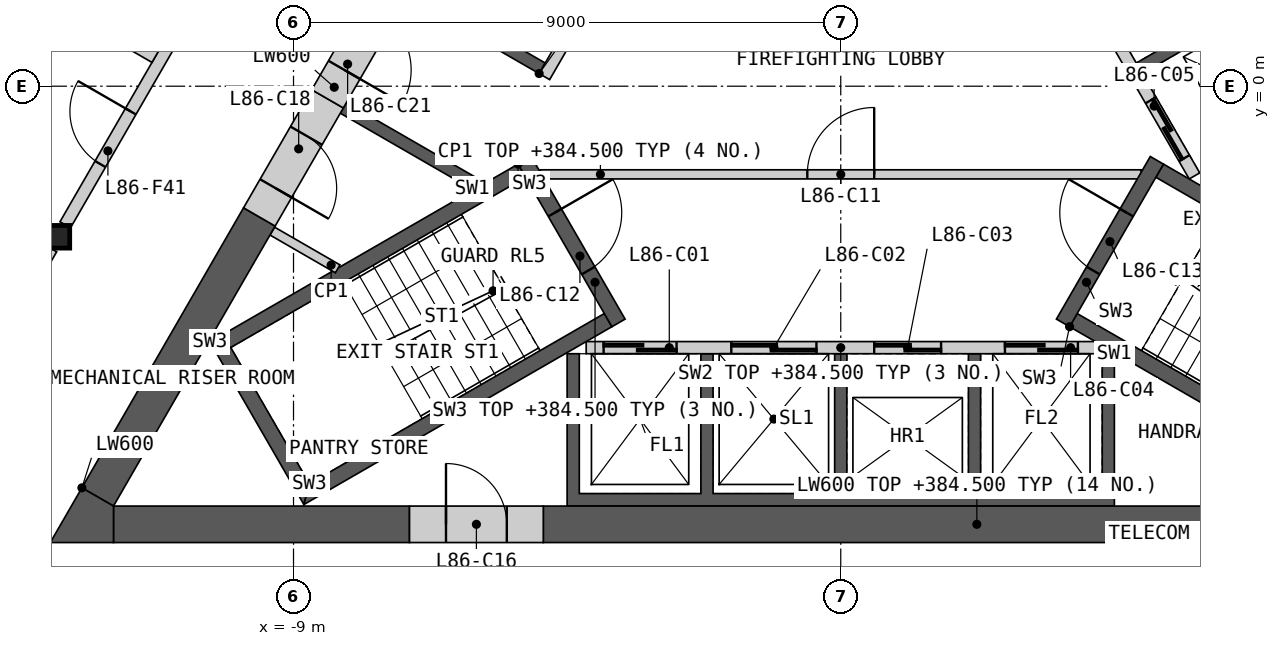
"""IFC4 building model, lengths in metres.
Left out: names, types, materials, properties, quantities, classifications, styles, units other than length and angle.
Written with IfcOpenShell. Run it as: python <this file> out.ifc"""

import sys

from ifc_helpers import new_model, si_unit, direction, frame, frame_2d, origin, origin_2d, place, context, subcontext, project, spatial, polyline, rectangle, i_section, outline, extrude, element, fill, save


model = new_model("IFC4")
c1 = context("Model", 3, precision=1e-05, world=origin(), true_north=direction((0.0, 1.0)))
c2 = subcontext(c1, "Body", "Model", "MODEL_VIEW")
j1 = project(units=[si_unit("LENGTHUNIT", "METRE"), si_unit("PLANEANGLEUNIT", "RADIAN")], contexts=[c1])
p1 = place(None, origin())
s1 = spatial("IfcSite", under=j1, at=p1, CompositionType="ELEMENT")
p2 = place(p1, origin())
s2 = spatial("IfcBuilding", under=s1, at=p2, CompositionType="ELEMENT")
p3 = place(p2, frame((0.0, 0.0, 381.4)))
s3 = spatial("IfcBuildingStorey", under=s2, at=p3, CompositionType="ELEMENT", Elevation=381.4)
p4 = place(p3, frame((-12.868, -2.476, 0.0), z_axis=(0.0, 0.0, 1.0), x_axis=(1.0, 0.0, 0.0)))
e1 = element("IfcColumn", 1, at=p4, inside=s3, PredefinedType="COLUMN", context=c2, shape_type="SweptSolid", body=[
    extrude(i_section(OverallWidth=0.374, OverallDepth=0.372, WebThickness=0.016, FlangeThickness=0.026, at=origin_2d()), origin(), (0.0, 0.0, 1.0), 3.4),
])
p5 = place(p3, origin())
e2 = element("IfcWall", 2, at=p5, inside=s3, PredefinedType="SHEAR", context=c2, shape_type="SweptSolid", body=[
    extrude(outline(polyline([(4.5, -4.4), (4.5, -6.906), (-4.5, -6.906), (-4.5, -4.4), (-4.3, -4.4), (-4.3, -6.7), (-2.3, -6.7), (-2.3, -4.4), (-2.1, -4.4), (-2.1, -6.7), (-0.1, -6.7), (-0.1, -4.4), (0.1, -4.4), (0.1, -6.7), (2.1, -6.7), (2.1, -4.4), (2.3, -4.4), (2.3, -6.7), (4.3, -6.7), (4.3, -4.4), (4.5, -4.4)])), origin(), (0.0, 0.0, 1.0), 3.1),
])
p6 = place(p3, frame((-4.187, -4.3, 0.0), z_axis=(0.0, 0.0, 1.0), x_axis=(1.0, 0.0, 0.0)))
e3 = element("IfcWall", 3, at=p6, inside=s3, PredefinedType="SOLIDWALL", context=c2, shape_type="SweptSolid", body=[
    extrude(rectangle(XDim=8.373, YDim=0.2, at=frame_2d((4.187, 0.0))), origin(), (0.0, 0.0, 1.0), 3.1),
])
p7 = place(p6, frame((0.287, 0.0, 0.0)))
e4 = element("IfcOpeningElement", 4, at=p7, cuts=e3, PredefinedType="OPENING", context=c2, shape_type="SweptSolid", body=[
    extrude(rectangle(XDim=1.2, YDim=2.1, at=frame_2d((0.6, 1.05))), frame((0.0, 0.11, 0.0), z_axis=(0.0, -1.0, 0.0), x_axis=(1.0, 0.0, 0.0)), (0.0, 0.0, 1.0), 0.22),
])
p8 = place(p6, frame((2.387, 0.0, 0.0)))
e5 = element("IfcOpeningElement", 5, at=p8, cuts=e3, PredefinedType="OPENING", context=c2, shape_type="SweptSolid", body=[
    extrude(rectangle(XDim=1.4, YDim=2.1, at=frame_2d((0.7, 1.05))), frame((0.0, 0.11, 0.0), z_axis=(0.0, -1.0, 0.0), x_axis=(1.0, 0.0, 0.0)), (0.0, 0.0, 1.0), 0.22),
])
p9 = place(p6, frame((4.737, 0.0, 0.0)))
e6 = element("IfcOpeningElement", 6, at=p9, cuts=e3, PredefinedType="OPENING", context=c2, shape_type="SweptSolid", body=[
    extrude(rectangle(XDim=1.1, YDim=2.1, at=frame_2d((0.55, 1.05))), frame((0.0, 0.11, 0.0), z_axis=(0.0, -1.0, 0.0), x_axis=(1.0, 0.0, 0.0)), (0.0, 0.0, 1.0), 0.22),
])
p10 = place(p6, frame((6.887, 0.0, 0.0)))
e7 = element("IfcOpeningElement", 7, at=p10, cuts=e3, PredefinedType="OPENING", context=c2, shape_type="SweptSolid", body=[
    extrude(rectangle(XDim=1.2, YDim=2.1, at=frame_2d((0.6, 1.05))), frame((0.0, 0.11, 0.0), z_axis=(0.0, -1.0, 0.0), x_axis=(1.0, 0.0, 0.0)), (0.0, 0.0, 1.0), 0.22),
])
p11 = place(p3, origin())
e8 = element("IfcWall", 8, at=p11, inside=s3, PredefinedType="SHEAR", context=c2, shape_type="SweptSolid", body=[
    extrude(outline(polyline([(1.561, 6.097), (3.731, 7.35), (8.231, -0.444), (6.061, -1.697), (5.96, -1.524), (7.952, -0.374), (6.952, 1.358), (4.96, 0.208), (4.861, 0.381), (6.852, 1.531), (5.852, 3.263), (3.861, 2.113), (3.76, 2.287), (5.752, 3.437), (4.752, 5.169), (2.76, 4.019), (2.66, 4.192), (4.652, 5.342), (3.652, 7.074), (1.66, 5.924), (1.561, 6.097)])), origin(), (0.0, 0.0, 1.0), 3.1),
])
p12 = place(p3, frame((5.817, -1.476, 0.0), z_axis=(0.0, 0.0, 1.0), x_axis=(-0.500002616675, 0.866023893041, 0.0)))
e9 = element("IfcWall", 9, at=p12, inside=s3, PredefinedType="SOLIDWALL", context=c2, shape_type="SweptSolid", body=[
    extrude(rectangle(XDim=8.373, YDim=0.2, at=frame_2d((4.187, 0.0))), origin(), (0.0, 0.0, 1.0), 3.1),
])
p13 = place(p12, frame((0.337, 0.0, 0.0)))
e10 = element("IfcOpeningElement", 10, at=p13, cuts=e9, PredefinedType="OPENING", context=c2, shape_type="SweptSolid", body=[
    extrude(rectangle(XDim=1.1, YDim=2.1, at=frame_2d((0.55, 1.05))), frame((0.0, 0.11, 0.0), z_axis=(0.0, -1.0, 0.0), x_axis=(1.0, 0.0, 0.0)), (0.0, 0.0, 1.0), 0.22),
])
p14 = place(p12, frame((2.537, 0.0, 0.0)))
e11 = element("IfcOpeningElement", 11, at=p14, cuts=e9, PredefinedType="OPENING", context=c2, shape_type="SweptSolid", body=[
    extrude(rectangle(XDim=1.1, YDim=2.1, at=frame_2d((0.55, 1.05))), frame((0.0, 0.11, 0.0), z_axis=(0.0, -1.0, 0.0), x_axis=(1.0, 0.0, 0.0)), (0.0, 0.0, 1.0), 0.22),
])
p15 = place(p12, frame((4.737, 0.0, 0.0)))
e12 = element("IfcOpeningElement", 12, at=p15, cuts=e9, PredefinedType="OPENING", context=c2, shape_type="SweptSolid", body=[
    extrude(rectangle(XDim=1.1, YDim=2.1, at=frame_2d((0.55, 1.05))), frame((0.0, 0.11, 0.0), z_axis=(0.0, -1.0, 0.0), x_axis=(1.0, 0.0, 0.0)), (0.0, 0.0, 1.0), 0.22),
])
p16 = place(p12, frame((7.037, 0.0, 0.0)))
e13 = element("IfcOpeningElement", 13, at=p16, cuts=e9, PredefinedType="OPENING", context=c2, shape_type="SweptSolid", body=[
    extrude(rectangle(XDim=0.9, YDim=2.1, at=frame_2d((0.45, 1.05))), frame((0.0, 0.11, 0.0), z_axis=(0.0, -1.0, 0.0), x_axis=(1.0, 0.0, 0.0)), (0.0, 0.0, 1.0), 0.22),
])
p17 = place(p3, origin())
e14 = element("IfcWall", 14, at=p17, inside=s3, PredefinedType="SHEAR", context=c2, shape_type="SweptSolid", body=[
    extrude(outline(polyline([(-6.061, -1.697), (-8.231, -0.444), (-8.131, -0.271), (-5.96, -1.524), (-6.061, -1.697)])), origin(), (0.0, 0.0, 1.0), 3.1),
])
p18 = place(p3, origin())
e15 = element("IfcWall", 15, at=p18, inside=s3, PredefinedType="SHEAR", context=c2, shape_type="SweptSolid", body=[
    extrude(outline(polyline([(-4.96, 0.208), (-7.131, 1.461), (-3.731, 7.35), (-1.561, 6.097), (-1.66, 5.924), (-3.652, 7.074), (-4.652, 5.342), (-2.66, 4.192), (-2.76, 4.019), (-4.752, 5.169), (-6.852, 1.531), (-4.861, 0.381), (-4.96, 0.208)])), origin(), (0.0, 0.0, 1.0), 3.1),
])
p19 = place(p3, frame((-1.631, 5.776, 0.0), z_axis=(0.0, 0.0, 1.0), x_axis=(-0.499992876559, -0.866029516466, 0.0)))
e16 = element("IfcWall", 16, at=p19, inside=s3, PredefinedType="SOLIDWALL", context=c2, shape_type="SweptSolid", body=[
    extrude(rectangle(XDim=6.486, YDim=0.2, at=frame_2d((3.243, 0.0))), origin(), (0.0, 0.0, 1.0), 3.1),
])
p20 = place(p19, frame((0.437, 0.0, 0.0)))
e17 = element("IfcOpeningElement", 17, at=p20, cuts=e16, PredefinedType="OPENING", context=c2, shape_type="SweptSolid", body=[
    extrude(rectangle(XDim=0.9, YDim=2.1, at=frame_2d((0.45, 1.05))), frame((0.0, 0.11, 0.0), z_axis=(0.0, -1.0, 0.0), x_axis=(1.0, 0.0, 0.0)), (0.0, 0.0, 1.0), 0.22),
])
p21 = place(p19, frame((3.737, 0.0, 0.0)))
e18 = element("IfcOpeningElement", 18, at=p21, cuts=e16, PredefinedType="OPENING", context=c2, shape_type="SweptSolid", body=[
    extrude(rectangle(XDim=0.9, YDim=2.1, at=frame_2d((0.45, 1.05))), frame((0.0, 0.11, 0.0), z_axis=(0.0, -1.0, 0.0), x_axis=(1.0, 0.0, 0.0)), (0.0, 0.0, 1.0), 0.22),
])
p22 = place(p3, frame((-4.941, -1.45, 0.0), z_axis=(0.0, 0.0, 1.0), x_axis=(1.0, 0.0, 0.0)))
e19 = element("IfcWall", 19, at=p22, inside=s3, PredefinedType="PARTITIONING", context=c2, shape_type="SweptSolid", body=[
    extrude(rectangle(XDim=9.882, YDim=0.15, at=frame_2d((4.941, 0.0))), origin(), (0.0, 0.0, 1.0), 3.1),
])
p23 = place(p22, frame((4.391, 0.0, 0.0)))
e20 = element("IfcOpeningElement", 20, at=p23, cuts=e19, PredefinedType="OPENING", context=c2, shape_type="SweptSolid", body=[
    extrude(rectangle(XDim=1.1, YDim=2.1, at=frame_2d((0.55, 1.05))), frame((0.0, 0.085, 0.0), z_axis=(0.0, -1.0, 0.0), x_axis=(1.0, 0.0, 0.0)), (0.0, 0.0, 1.0), 0.17),
])
p24 = place(p3, origin())
e21 = element("IfcWall", 21, at=p24, inside=s3, PredefinedType="SHEAR", context=c2, shape_type="SweptSolid", body=[
    extrude(outline(polyline([(-5.307, -1.281), (-10.374, -4.206), (-10.032, -4.298), (-5.182, -1.498), (-5.307, -1.281)])), origin(), (0.0, 0.0, 1.0), 3.1),
])
p25 = place(p3, origin())
e22 = element("IfcWall", 22, at=p25, inside=s3, PredefinedType="SHEAR", context=c2, shape_type="SweptSolid", body=[
    extrude(outline(polyline([(-10.374, -4.206), (-8.83, -6.881), (-8.738, -6.539), (-10.032, -4.298), (-10.374, -4.206)])), origin(), (0.0, 0.0, 1.0), 3.1),
])
p26 = place(p3, origin())
e23 = element("IfcWall", 23, at=p26, inside=s3, PredefinedType="SHEAR", context=c2, shape_type="SweptSolid", body=[
    extrude(outline(polyline([(-8.738, -6.539), (-8.83, -6.881), (-3.763, -3.956), (-3.888, -3.739), (-8.738, -6.539)])), origin(), (0.0, 0.0, 1.0), 3.1),
])
p27 = place(p3, frame((-5.199, -1.219, 0.0), z_axis=(0.0, 0.0, 1.0), x_axis=(0.499982516597, -0.866035497597, 0.0)))
e24 = element("IfcWall", 24, at=p27, inside=s3, PredefinedType="SHEAR", context=c2, shape_type="SweptSolid", body=[
    extrude(rectangle(XDim=3.088, YDim=0.25, at=frame_2d((1.544, 0.0))), origin(), (0.0, 0.0, 1.0), 3.1),
])
p28 = place(p27, frame((0.994, 0.0, 0.0)))
e25 = element("IfcOpeningElement", 25, at=p28, cuts=e24, PredefinedType="OPENING", context=c2, shape_type="SweptSolid", body=[
    extrude(rectangle(XDim=1.1, YDim=2.1, at=frame_2d((0.55, 1.05))), frame((0.0, 0.135, 0.0), z_axis=(0.0, -1.0, 0.0), x_axis=(1.0, 0.0, 0.0)), (0.0, 0.0, 1.0), 0.27),
])
p29 = place(p3, origin())
e26 = element("IfcWall", 26, at=p29, inside=s3, PredefinedType="SHEAR", context=c2, shape_type="SweptSolid", body=[
    extrude(outline(polyline([(3.763, -3.956), (8.83, -6.881), (8.738, -6.539), (3.888, -3.739), (3.763, -3.956)])), origin(), (0.0, 0.0, 1.0), 3.1),
])
p30 = place(p3, origin())
e27 = element("IfcWall", 27, at=p30, inside=s3, PredefinedType="SHEAR", context=c2, shape_type="SweptSolid", body=[
    extrude(outline(polyline([(10.032, -4.298), (10.374, -4.206), (5.307, -1.281), (5.182, -1.498), (10.032, -4.298)])), origin(), (0.0, 0.0, 1.0), 3.1),
])
p31 = place(p3, frame((3.655, -3.893, 0.0), z_axis=(0.0, 0.0, 1.0), x_axis=(0.499982516597, 0.866035497597, 0.0)))
e28 = element("IfcWall", 28, at=p31, inside=s3, PredefinedType="SHEAR", context=c2, shape_type="SweptSolid", body=[
    extrude(rectangle(XDim=3.088, YDim=0.25, at=frame_2d((1.544, 0.0))), origin(), (0.0, 0.0, 1.0), 3.1),
])
p32 = place(p31, frame((0.994, 0.0, 0.0)))
e29 = element("IfcOpeningElement", 29, at=p32, cuts=e28, PredefinedType="OPENING", context=c2, shape_type="SweptSolid", body=[
    extrude(rectangle(XDim=1.1, YDim=2.1, at=frame_2d((0.55, 1.05))), frame((0.0, 0.135, 0.0), z_axis=(0.0, -1.0, 0.0), x_axis=(1.0, 0.0, 0.0)), (0.0, 0.0, 1.0), 0.27),
])
p33 = place(p3, frame((-9.35, -2.383, 0.0), z_axis=(0.0, 0.0, 1.0), x_axis=(0.866057962423, -0.499943602543, 0.0)))
e30 = element("IfcWall", 30, at=p33, inside=s3, PredefinedType="PARTITIONING", context=c2, shape_type="SweptSolid", body=[
    extrude(rectangle(XDim=1.242, YDim=0.15, at=frame_2d((0.621, 0.0))), origin(), (0.0, 0.0, 1.0), 3.1),
])
p34 = place(p3, frame((-4.892, -7.206, 0.0), z_axis=(0.0, 0.0, 1.0), x_axis=(1.0, 0.0, 0.0)))
e31 = element("IfcWall", 31, at=p34, inside=s3, PredefinedType="SHEAR", context=c2, shape_type="SweptSolid", body=[
    extrude(rectangle(XDim=14.261, YDim=0.6, at=frame_2d((7.13, 0.0))), origin(), (0.0, 0.0, 1.0), 3.1),
])
p35 = place(p3, frame((-11.961, -7.206, 0.0), z_axis=(0.0, 0.0, 1.0), x_axis=(1.0, 0.0, 0.0)))
e32 = element("IfcWall", 32, at=p35, inside=s3, PredefinedType="SHEAR", context=c2, shape_type="SweptSolid", body=[
    extrude(rectangle(XDim=4.868, YDim=0.6, at=frame_2d((2.434, 0.0))), origin(), (0.0, 0.0, 1.0), 3.1),
])
p36 = place(p3, frame((8.841, -0.902, 0.0), z_axis=(0.0, 0.0, 1.0), x_axis=(-0.499995618375, 0.866027933502, 0.0)))
e33 = element("IfcWall", 33, at=p36, inside=s3, PredefinedType="SHEAR", context=c2, shape_type="SweptSolid", body=[
    extrude(rectangle(XDim=14.571, YDim=0.6, at=frame_2d((7.285, 0.0))), origin(), (0.0, 0.0, 1.0), 3.1),
])
p37 = place(p3, frame((-9.562, -2.15, 0.0), z_axis=(0.0, 0.0, 1.0), x_axis=(-0.500015214976, -0.866016619236, 0.0)))
e34 = element("IfcWall", 34, at=p37, inside=s3, PredefinedType="SHEAR", context=c2, shape_type="SweptSolid", body=[
    extrude(rectangle(XDim=5.318, YDim=0.6, at=frame_2d((2.659, 0.0))), origin(), (0.0, 0.0, 1.0), 3.1),
])
p38 = place(p3, origin())
e35 = element("IfcWall", 35, at=p38, inside=s3, PredefinedType="SHEAR", context=c2, shape_type="SweptSolid", body=[
    extrude(outline(polyline([(-12.48, -6.606), (-11.961, -6.906), (-11.961, -7.506), (-13.0, -7.506), (-12.48, -6.606)])), origin(), (0.0, 0.0, 1.0), 3.1),
])
p39 = place(p3, frame((-7.092, -7.206, 0.0), z_axis=(0.0, 0.0, 1.0), x_axis=(1.0, 0.0, 0.0)))
e36 = element("IfcWall", 36, at=p39, inside=s3, PredefinedType="SHEAR", context=c2, shape_type="SweptSolid", body=[
    extrude(rectangle(XDim=2.2, YDim=0.6, at=frame_2d((1.1, 0.0))), origin(), (0.0, 0.0, 1.0), 3.1),
])
p40 = place(p39, frame((0.6, 0.0, 0.0)))
e37 = element("IfcOpeningElement", 37, at=p40, cuts=e36, PredefinedType="OPENING", context=c2, shape_type="SweptSolid", body=[
    extrude(rectangle(XDim=1.0, YDim=2.1, at=frame_2d((0.5, 1.05))), frame((0.0, 0.31, 0.0), z_axis=(0.0, -1.0, 0.0), x_axis=(1.0, 0.0, 0.0)), (0.0, 0.0, 1.0), 0.62),
])
p41 = place(p3, frame((-8.44, -0.208, 0.0), z_axis=(0.0, 0.0, 1.0), x_axis=(-0.500001951578, -0.866024277037, 0.0)))
e38 = element("IfcWall", 38, at=p41, inside=s3, PredefinedType="SHEAR", context=c2, shape_type="SweptSolid", body=[
    extrude(rectangle(XDim=2.243, YDim=0.6, at=frame_2d((1.122, 0.0))), origin(), (0.0, 0.0, 1.0), 3.1),
])
p42 = place(p41, frame((0.7, 0.0, 0.0)))
e39 = element("IfcOpeningElement", 39, at=p42, cuts=e38, PredefinedType="OPENING", context=c2, shape_type="SweptSolid", body=[
    extrude(rectangle(XDim=1.0, YDim=2.1, at=frame_2d((0.5, 1.05))), frame((0.0, 0.31, 0.0), z_axis=(0.0, -1.0, 0.0), x_axis=(1.0, 0.0, 0.0)), (0.0, 0.0, 1.0), 0.62),
])
p43 = place(p3, frame((-7.34, 1.698, 0.0), z_axis=(0.0, 0.0, 1.0), x_axis=(-0.50002983664, -0.866008176907, 0.0)))
e40 = element("IfcWall", 40, at=p43, inside=s3, PredefinedType="SHEAR", context=c2, shape_type="SweptSolid", body=[
    extrude(rectangle(XDim=2.2, YDim=0.6, at=frame_2d((1.1, 0.0))), origin(), (0.0, 0.0, 1.0), 3.1),
])
p44 = place(p43, frame((0.55, 0.0, 0.0)))
e41 = element("IfcOpeningElement", 41, at=p44, cuts=e40, PredefinedType="OPENING", context=c2, shape_type="SweptSolid", body=[
    extrude(rectangle(XDim=1.1, YDim=2.1, at=frame_2d((0.55, 1.05))), frame((0.0, 0.31, 0.0), z_axis=(0.0, -1.0, 0.0), x_axis=(1.0, 0.0, 0.0)), (0.0, 0.0, 1.0), 0.62),
])
p45 = place(p3, frame((-12.754, -2.279, 0.0), z_axis=(0.0, 0.0, 1.0), x_axis=(0.500001682468, 0.866024432409, 0.0)))
e42 = element("IfcWall", 42, at=p45, inside=s3, PredefinedType="PARTITIONING", context=c2, shape_type="SweptSolid", body=[
    extrude(rectangle(XDim=8.124, YDim=0.2, at=frame_2d((4.062, 0.0))), origin(), (0.0, 0.0, 1.0), 3.1),
])
p46 = place(p45, frame((1.153, 0.0, 0.0)))
e43 = element("IfcOpeningElement", 43, at=p46, cuts=e42, PredefinedType="OPENING", context=c2, shape_type="SweptSolid", body=[
    extrude(rectangle(XDim=1.0, YDim=2.1, at=frame_2d((0.5, 1.05))), frame((0.0, 0.11, 0.0), z_axis=(0.0, -1.0, 0.0), x_axis=(1.0, 0.0, 0.0)), (0.0, 0.0, 1.0), 0.22),
])
p47 = place(p3, frame((-17.414, 4.049, 0.0), z_axis=(0.0, 0.0, 1.0), x_axis=(0.866033839264, -0.499985389037, 0.0)))
e44 = element("IfcWall", 44, at=p47, inside=s3, PredefinedType="PARTITIONING", context=c2, shape_type="SweptSolid", body=[
    extrude(rectangle(XDim=7.1, YDim=0.25, at=frame_2d((3.55, 0.0))), origin(), (0.0, 0.0, 1.0), 2.33),
])
p48 = place(p3, frame((-15.131, -6.397, 0.0), z_axis=(0.0, 0.0, 1.0), x_axis=(0.499986217557, 0.866033360935, 0.0)))
e45 = element("IfcWall", 45, at=p48, inside=s3, PredefinedType="PARTITIONING", context=c2, shape_type="SweptSolid", body=[
    extrude(rectangle(XDim=4.3, YDim=0.2, at=frame_2d((2.15, 0.0))), origin(), (0.0, 0.0, 1.0), 3.1),
])
p49 = place(p7, origin())
e46 = element("IfcDoor", 46, at=p49, inside=s3, OperationType="SLIDING_TO_LEFT", PredefinedType="DOOR", context=c2, shape_type="SweptSolid", body=[
    extrude(rectangle(XDim=1.2, YDim=2.1, at=frame_2d((0.6, 1.05))), frame((0.0, 0.025, 0.0), z_axis=(0.0, -1.0, 0.0), x_axis=(1.0, 0.0, 0.0)), (0.0, 0.0, 1.0), 0.05),
])
fill(e4, e46)
p50 = place(p8, origin())
e47 = element("IfcDoor", 47, at=p50, inside=s3, OperationType="SLIDING_TO_LEFT", PredefinedType="DOOR", context=c2, shape_type="SweptSolid", body=[
    extrude(rectangle(XDim=1.4, YDim=2.1, at=frame_2d((0.7, 1.05))), frame((0.0, 0.025, 0.0), z_axis=(0.0, -1.0, 0.0), x_axis=(1.0, 0.0, 0.0)), (0.0, 0.0, 1.0), 0.05),
])
fill(e5, e47)
p51 = place(p9, origin())
e48 = element("IfcDoor", 48, at=p51, inside=s3, OperationType="SLIDING_TO_LEFT", PredefinedType="DOOR", context=c2, shape_type="SweptSolid", body=[
    extrude(rectangle(XDim=1.1, YDim=2.1, at=frame_2d((0.55, 1.05))), frame((0.0, 0.025, 0.0), z_axis=(0.0, -1.0, 0.0), x_axis=(1.0, 0.0, 0.0)), (0.0, 0.0, 1.0), 0.05),
])
fill(e6, e48)
p52 = place(p10, origin())
e49 = element("IfcDoor", 49, at=p52, inside=s3, OperationType="SLIDING_TO_LEFT", PredefinedType="DOOR", context=c2, shape_type="SweptSolid", body=[
    extrude(rectangle(XDim=1.2, YDim=2.1, at=frame_2d((0.6, 1.05))), frame((0.0, 0.025, 0.0), z_axis=(0.0, -1.0, 0.0), x_axis=(1.0, 0.0, 0.0)), (0.0, 0.0, 1.0), 0.05),
])
fill(e7, e49)
p53 = place(p13, origin())
e50 = element("IfcDoor", 50, at=p53, inside=s3, OperationType="SLIDING_TO_LEFT", PredefinedType="DOOR", context=c2, shape_type="SweptSolid", body=[
    extrude(rectangle(XDim=1.1, YDim=2.1, at=frame_2d((0.55, 1.05))), frame((0.0, 0.025, 0.0), z_axis=(0.0, -1.0, 0.0), x_axis=(1.0, 0.0, 0.0)), (0.0, 0.0, 1.0), 0.05),
])
fill(e10, e50)
p54 = place(p23, origin())
e51 = element("IfcDoor", 51, at=p54, inside=s3, OperationType="SINGLE_SWING_RIGHT", PredefinedType="DOOR", context=c2, shape_type="SweptSolid", body=[
    extrude(rectangle(XDim=1.1, YDim=2.1, at=frame_2d((0.55, 1.05))), frame((0.0, 0.025, 0.0), z_axis=(0.0, -1.0, 0.0), x_axis=(1.0, 0.0, 0.0)), (0.0, 0.0, 1.0), 0.05),
])
fill(e20, e51)
p55 = place(p28, origin())
e52 = element("IfcDoor", 52, at=p55, inside=s3, OperationType="SINGLE_SWING_LEFT", PredefinedType="DOOR", context=c2, shape_type="SweptSolid", body=[
    extrude(rectangle(XDim=1.1, YDim=2.1, at=frame_2d((0.55, 1.05))), frame((0.0, 0.025, 0.0), z_axis=(0.0, -1.0, 0.0), x_axis=(1.0, 0.0, 0.0)), (0.0, 0.0, 1.0), 0.05),
])
fill(e25, e52)
p56 = place(p32, origin())
e53 = element("IfcDoor", 53, at=p56, inside=s3, OperationType="SINGLE_SWING_RIGHT", PredefinedType="DOOR", context=c2, shape_type="SweptSolid", body=[
    extrude(rectangle(XDim=1.1, YDim=2.1, at=frame_2d((0.55, 1.05))), frame((0.0, 0.025, 0.0), z_axis=(0.0, -1.0, 0.0), x_axis=(1.0, 0.0, 0.0)), (0.0, 0.0, 1.0), 0.05),
])
fill(e29, e53)
p57 = place(p40, origin())
e54 = element("IfcDoor", 54, at=p57, inside=s3, OperationType="SINGLE_SWING_LEFT", PredefinedType="DOOR", context=c2, shape_type="SweptSolid", body=[
    extrude(rectangle(XDim=1.0, YDim=2.1, at=frame_2d((0.5, 1.05))), frame((0.0, 0.055, 0.0), z_axis=(0.0, -1.0, 0.0), x_axis=(1.0, 0.0, 0.0)), (0.0, 0.0, 1.0), 0.05),
])
fill(e37, e54)
p58 = place(p42, origin())
e55 = element("IfcDoor", 55, at=p58, inside=s3, OperationType="SINGLE_SWING_RIGHT", PredefinedType="DOOR", context=c2, shape_type="SweptSolid", body=[
    extrude(rectangle(XDim=1.0, YDim=2.1, at=frame_2d((0.5, 1.05))), frame((0.0, 0.055, 0.0), z_axis=(0.0, -1.0, 0.0), x_axis=(1.0, 0.0, 0.0)), (0.0, 0.0, 1.0), 0.05),
])
fill(e39, e55)
p59 = place(p44, origin())
e56 = element("IfcDoor", 56, at=p59, inside=s3, OperationType="SINGLE_SWING_RIGHT", PredefinedType="DOOR", context=c2, shape_type="SweptSolid", body=[
    extrude(rectangle(XDim=1.1, YDim=2.1, at=frame_2d((0.55, 1.05))), frame((0.0, 0.055, 0.0), z_axis=(0.0, -1.0, 0.0), x_axis=(1.0, 0.0, 0.0)), (0.0, 0.0, 1.0), 0.05),
])
fill(e41, e56)
p60 = place(p46, origin())
e57 = element("IfcDoor", 57, at=p60, inside=s3, OperationType="SINGLE_SWING_RIGHT", PredefinedType="DOOR", context=c2, shape_type="SweptSolid", body=[
    extrude(rectangle(XDim=1.0, YDim=2.1, at=frame_2d((0.5, 1.05))), frame((0.0, 0.025, 0.0), z_axis=(0.0, -1.0, 0.0), x_axis=(1.0, 0.0, 0.0)), (0.0, 0.0, 1.0), 0.05),
])
fill(e43, e57)
save(model, sys.argv[1])
